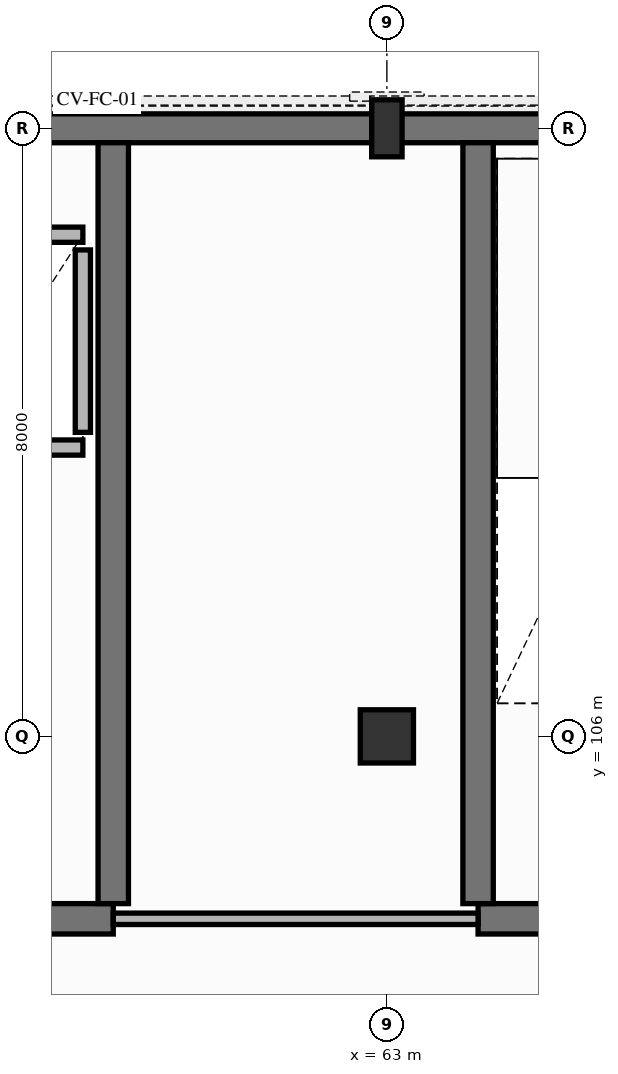
"""IFC4 building model, lengths in metres.
Left out: names, types, materials, properties, quantities, classifications, styles, units other than length and angle.
Written with IfcOpenShell. Run it as: python <this file> out.ifc"""

import sys

from ifc_helpers import new_model, si_unit, direction, frame, frame_2d, origin, origin_2d, place, context, subcontext, project, spatial, rectangle, extrude, element, fill, save


model = new_model("IFC4")
c1 = context("Model", 3, precision=1e-05, world=origin(), true_north=direction((0.0, 1.0)))
c2 = subcontext(c1, "Body", "Model", "MODEL_VIEW")
j1 = project(units=[si_unit("LENGTHUNIT", "METRE"), si_unit("PLANEANGLEUNIT", "RADIAN")], contexts=[c1])
p1 = place(None, origin())
s1 = spatial("IfcSite", under=j1, at=p1, CompositionType="ELEMENT")
p2 = place(p1, origin())
s2 = spatial("IfcBuilding", under=s1, at=p2, CompositionType="ELEMENT")
p3 = place(p2, frame((0.0, 0.0, 12.78)))
s3 = spatial("IfcBuildingStorey", under=s2, at=p3, CompositionType="ELEMENT", Elevation=12.78)
p4 = place(p3, frame((63.0, 106.0, 0.0), z_axis=(0.0, 0.0, 1.0), x_axis=(1.0, 0.0, 0.0)))
e1 = element("IfcColumn", 1, at=p4, inside=s3, PredefinedType="COLUMN", context=c2, shape_type="SweptSolid", body=[
    extrude(rectangle(XDim=0.7, YDim=0.7, at=origin_2d()), origin(), (0.0, 0.0, 1.0), 3.74),
])
p5 = place(p3, frame((63.0, 114.0, 0.0), z_axis=(0.0, 0.0, 1.0), x_axis=(0.0, 1.0, 0.0)))
e2 = element("IfcColumn", 2, at=p5, inside=s3, PredefinedType="COLUMN", context=c2, shape_type="SweptSolid", body=[
    extrude(rectangle(XDim=0.4, YDim=0.75, at=origin_2d()), origin(), (0.0, 0.0, 1.0), 3.74),
])
for number, where, z_axis, x_axis in (
    (3, (54.0, 114.0, 0.0), (0.0, 0.0, 1.0), (1.0, 0.0, 0.0)),
    (4, (63.0, 114.0, 0.0), (0.0, 0.0, 1.0), (1.0, 0.0, 0.0)),
):
    element("IfcWall", number, at=place(p3, frame(where, z_axis=z_axis, x_axis=x_axis)), inside=s3, PredefinedType="SOLIDWALL", context=c2, shape_type="SweptSolid", body=[
        extrude(rectangle(XDim=9.0, YDim=0.38, at=frame_2d((4.5, 0.0))), origin(), (0.0, 0.0, 1.0), 3.42),
    ])
p6 = place(p3, frame((46.2, 103.6, 0.0), z_axis=(0.0, 0.0, 1.0), x_axis=(1.0, 0.0, 0.0)))
e5 = element("IfcWall", 5, at=p6, inside=s3, PredefinedType="SHEAR", context=c2, shape_type="SweptSolid", body=[
    extrude(rectangle(XDim=13.2, YDim=0.4, at=frame_2d((6.6, 0.0))), origin(), (0.0, 0.0, 1.0), 3.42),
])
p7 = place(p6, frame((5.8, 0.0, 0.0)))
e6 = element("IfcOpeningElement", 6, at=p7, cuts=e5, PredefinedType="OPENING", context=c2, shape_type="SweptSolid", body=[
    extrude(rectangle(XDim=1.5, YDim=2.2, at=frame_2d((0.75, 1.1))), frame((0.0, 0.21, 0.0), z_axis=(0.0, -1.0, 0.0), x_axis=(1.0, 0.0, 0.0)), (0.0, 0.0, 1.0), 0.42),
])
p8 = place(p3, frame((59.4, 103.8, 0.0), z_axis=(0.0, 0.0, 1.0), x_axis=(0.0, 1.0, 0.0)))
e7 = element("IfcWall", 7, at=p8, inside=s3, PredefinedType="SHEAR", context=c2, shape_type="SweptSolid", body=[
    extrude(rectangle(XDim=10.01, YDim=0.4, at=frame_2d((5.005, 0.0))), origin(), (0.0, 0.0, 1.0), 3.42),
])
p9 = place(p3, frame((57.2, 109.8, 0.0), z_axis=(0.0, 0.0, 1.0), x_axis=(1.0, 0.0, 0.0)))
e8 = element("IfcWall", 8, at=p9, inside=s3, PredefinedType="PARTITIONING", context=c2, shape_type="SweptSolid", body=[
    extrude(rectangle(XDim=1.8, YDim=0.2, at=frame_2d((0.9, 0.0))), origin(), (0.0, 0.0, 1.0), 3.42),
])
p10 = place(p9, frame((0.45, 0.0, 0.0)))
e9 = element("IfcOpeningElement", 9, at=p10, cuts=e8, PredefinedType="OPENING", context=c2, shape_type="SweptSolid", body=[
    extrude(rectangle(XDim=0.9, YDim=2.1, at=frame_2d((0.45, 1.05))), frame((0.0, 0.11, 0.0), z_axis=(0.0, -1.0, 0.0), x_axis=(1.0, 0.0, 0.0)), (0.0, 0.0, 1.0), 0.22),
])
p11 = place(p3, frame((57.2, 112.6, 0.0), z_axis=(0.0, 0.0, 1.0), x_axis=(1.0, 0.0, 0.0)))
e10 = element("IfcWall", 10, at=p11, inside=s3, PredefinedType="PARTITIONING", context=c2, shape_type="SweptSolid", body=[
    extrude(rectangle(XDim=1.8, YDim=0.2, at=frame_2d((0.9, 0.0))), origin(), (0.0, 0.0, 1.0), 3.42),
])
p12 = place(p3, frame((59.0, 110.0, 0.0), z_axis=(0.0, 0.0, 1.0), x_axis=(0.0, 1.0, 0.0)))
e11 = element("IfcWall", 11, at=p12, inside=s3, PredefinedType="PARTITIONING", context=c2, shape_type="SweptSolid", body=[
    extrude(rectangle(XDim=2.4, YDim=0.2, at=frame_2d((1.2, 0.0))), origin(), (0.0, 0.0, 1.0), 3.42),
])
p13 = place(p3, frame((64.2, 103.6, 0.0), z_axis=(0.0, 0.0, 1.0), x_axis=(1.0, 0.0, 0.0)))
e12 = element("IfcWall", 12, at=p13, inside=s3, PredefinedType="SHEAR", context=c2, shape_type="SweptSolid", body=[
    extrude(rectangle(XDim=13.2, YDim=0.4, at=frame_2d((6.6, 0.0))), origin(), (0.0, 0.0, 1.0), 3.42),
])
p14 = place(p13, frame((5.8, 0.0, 0.0)))
e13 = element("IfcOpeningElement", 13, at=p14, cuts=e12, PredefinedType="OPENING", context=c2, shape_type="SweptSolid", body=[
    extrude(rectangle(XDim=1.5, YDim=2.2, at=frame_2d((0.75, 1.1))), frame((0.0, 0.21, 0.0), z_axis=(0.0, -1.0, 0.0), x_axis=(1.0, 0.0, 0.0)), (0.0, 0.0, 1.0), 0.42),
])
p15 = place(p3, frame((64.2, 103.8, 0.0), z_axis=(0.0, 0.0, 1.0), x_axis=(0.0, 1.0, 0.0)))
e14 = element("IfcWall", 14, at=p15, inside=s3, PredefinedType="SHEAR", context=c2, shape_type="SweptSolid", body=[
    extrude(rectangle(XDim=10.01, YDim=0.4, at=frame_2d((5.005, 0.0))), origin(), (0.0, 0.0, 1.0), 3.42),
])
p16 = place(p3, frame((59.4, 103.6, 0.0), z_axis=(0.0, 0.0, 1.0), x_axis=(1.0, 0.0, 0.0)))
e15 = element("IfcWall", 15, at=p16, inside=s3, PredefinedType="PARTITIONING", context=c2, shape_type="SweptSolid", body=[
    extrude(rectangle(XDim=4.8, YDim=0.15, at=frame_2d((2.4, 0.0))), origin(), (0.0, 0.0, 1.0), 3.42),
])
p17 = place(p16, frame((1.6, 0.0, 0.0)))
e16 = element("IfcOpeningElement", 16, at=p17, cuts=e15, PredefinedType="OPENING", context=c2, shape_type="SweptSolid", body=[
    extrude(rectangle(XDim=1.0, YDim=2.15, at=frame_2d((0.5, 1.075))), frame((0.0, 0.085, 0.0), z_axis=(0.0, -1.0, 0.0), x_axis=(1.0, 0.0, 0.0)), (0.0, 0.0, 1.0), 0.17),
])
p18 = place(p17, origin())
e17 = element("IfcDoor", 17, at=p18, inside=s3, OperationType="SINGLE_SWING_RIGHT", PredefinedType="DOOR", context=c2, shape_type="SweptSolid", body=[
    extrude(rectangle(XDim=1.0, YDim=2.15, at=frame_2d((0.5, 1.075))), frame((0.0, 0.025, 0.0), z_axis=(0.0, -1.0, 0.0), x_axis=(1.0, 0.0, 0.0)), (0.0, 0.0, 1.0), 0.05),
])
fill(e16, e17)
save(model, sys.argv[1])
